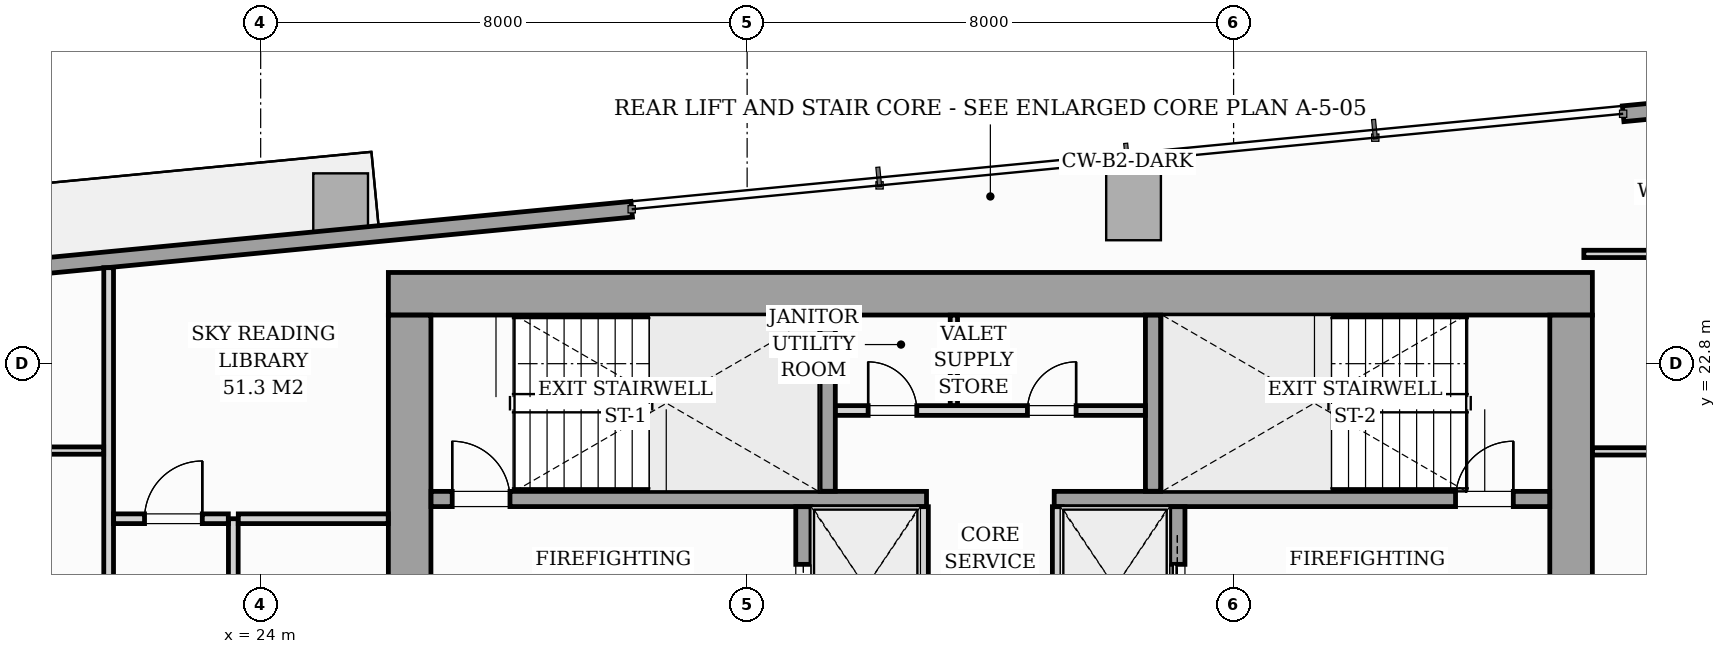
"""IFC4 building model, lengths in metres.
Left out: names, types, materials, properties, quantities, classifications, styles, units other than length and angle.
Written with IfcOpenShell. Run it as: python <this file> out.ifc"""

import sys

from ifc_helpers import new_model, si_unit, direction, frame, frame_2d, origin, origin_2d, place, context, subcontext, project, spatial, rectangle, i_section, extrude, source, transform, mapped, element, fill, save


model = new_model("IFC4")
c1 = context("Model", 3, precision=1e-05, world=origin(), true_north=direction((0.0, 1.0)))
c2 = subcontext(c1, "Body", "Model", "MODEL_VIEW")
j1 = project(units=[si_unit("LENGTHUNIT", "METRE"), si_unit("PLANEANGLEUNIT", "RADIAN")], contexts=[c1])
p1 = place(None, origin())
s1 = spatial("IfcSite", under=j1, at=p1, CompositionType="ELEMENT")
p2 = place(p1, origin())
s2 = spatial("IfcBuilding", under=s1, at=p2, CompositionType="ELEMENT")
p3 = place(p2, frame((0.0, 0.0, 100.2)))
s3 = spatial("IfcBuildingStorey", under=s2, at=p3, CompositionType="ELEMENT", Elevation=100.2)
m1 = source(origin(), c2, "Body", "SweptSolid", [
    extrude(i_section(OverallWidth=0.427, OverallDepth=0.483, WebThickness=0.051, FlangeThickness=0.082, FilletRadius=0.018, at=origin_2d()), origin(), (0.0, 0.0, 1.0), 3.196),
])
for number, where, z_axis, x_axis in (
    (1, (26.4, 24.0, 0.002), (0.0, 0.0, 1.0), (1.0, 0.0, 0.0)),
    (2, (33.12, 24.0, 0.002), (0.0, 0.0, 1.0), (1.0, 0.0, 0.0)),
    (3, (38.88, 24.0, 0.002), (0.0, 0.0, 1.0), (1.0, 0.0, 0.0)),
    (4, (45.6, 24.0, 0.002), (0.0, 0.0, 1.0), (1.0, 0.0, 0.0)),
):
    element("IfcColumn", number, at=place(p3, frame(where, z_axis=z_axis, x_axis=x_axis)), inside=s3, PredefinedType="PILASTER", context=c2, shape_type="MappedRepresentation", body=[
        mapped(m1, transform((0.0, 0.0, 0.0), scale=1.0)),
    ])
m2 = source(origin(), c2, "Body", "SweptSolid", [
    extrude(rectangle(XDim=0.9, YDim=1.1, at=origin_2d()), origin(), (0.0, 0.0, 1.0), 3.196),
])
for number, where, z_axis, x_axis in (
    (5, (25.315, 25.38, 0.002), (0.0, 0.0, 1.0), (0.995, 0.096, 0.0)),
    (6, (38.354, 25.38, 0.002), (0.0, 0.0, 1.0), (0.995, 0.096, 0.0)),
):
    element("IfcColumn", number, at=place(p3, frame(where, z_axis=z_axis, x_axis=x_axis)), inside=s3, PredefinedType="COLUMN", context=c2, shape_type="MappedRepresentation", body=[
        mapped(m2, transform((0.0, 0.0, 0.0), scale=1.0)),
    ])
p4 = place(p3, frame((11.08, 23.508, 0.0), z_axis=(0.0, 0.0, 1.0), x_axis=(0.995396638587, 0.095841180552, 0.0)))
e7 = element("IfcWall", 7, at=p4, inside=s3, PredefinedType="STANDARD", context=c2, shape_type="SweptSolid", body=[
    extrude(rectangle(XDim=19.11, YDim=0.26, at=frame_2d((9.555, 0.0))), origin(), (0.0, 0.0, 1.0), 2.94),
])
p5 = place(p4, frame((7.107, 0.0, 0.0)))
e8 = element("IfcOpeningElement", 8, at=p5, cuts=e7, PredefinedType="OPENING", context=c2, shape_type="SweptSolid", body=[
    extrude(rectangle(XDim=1.8, YDim=2.06, at=frame_2d((0.9, 1.03))), frame((0.0, 0.14, 0.0), z_axis=(0.0, -1.0, 0.0), x_axis=(1.0, 0.0, 0.0)), (0.0, 0.0, 1.0), 0.28),
])
p6 = place(p4, frame((2.05, 0.0, 0.65)))
e9 = element("IfcOpeningElement", 9, at=p6, cuts=e7, PredefinedType="OPENING", context=c2, shape_type="SweptSolid", body=[
    extrude(rectangle(XDim=1.6, YDim=1.5, at=frame_2d((0.8, 0.75))), frame((0.0, 0.14, 0.0), z_axis=(0.0, -1.0, 0.0), x_axis=(1.0, 0.0, 0.0)), (0.0, 0.0, 1.0), 0.28),
])
p7 = place(p3, frame((46.406, 26.91, 0.0), z_axis=(0.0, 0.0, 1.0), x_axis=(0.995396638587, 0.095841180552, 0.0)))
e10 = element("IfcWall", 10, at=p7, inside=s3, PredefinedType="STANDARD", context=c2, shape_type="SweptSolid", body=[
    extrude(rectangle(XDim=19.11, YDim=0.26, at=frame_2d((9.555, 0.0))), origin(), (0.0, 0.0, 1.0), 2.94),
])
p8 = place(p7, frame((9.7, 0.0, 0.0)))
e11 = element("IfcOpeningElement", 11, at=p8, cuts=e10, PredefinedType="OPENING", context=c2, shape_type="SweptSolid", body=[
    extrude(rectangle(XDim=1.8, YDim=2.06, at=frame_2d((0.9, 1.03))), frame((0.0, 0.14, 0.0), z_axis=(0.0, -1.0, 0.0), x_axis=(1.0, 0.0, 0.0)), (0.0, 0.0, 1.0), 0.28),
])
p9 = place(p7, frame((0.7, 0.0, 0.65)))
e12 = element("IfcOpeningElement", 12, at=p9, cuts=e10, PredefinedType="OPENING", context=c2, shape_type="SweptSolid", body=[
    extrude(rectangle(XDim=1.6, YDim=1.5, at=frame_2d((0.8, 0.75))), frame((0.0, 0.14, 0.0), z_axis=(0.0, -1.0, 0.0), x_axis=(1.0, 0.0, 0.0)), (0.0, 0.0, 1.0), 0.28),
])
p10 = place(p3, frame((26.1, 23.95, 0.0), z_axis=(0.0, 0.0, 1.0), x_axis=(1.0, 0.0, 0.0)))
e13 = element("IfcWall", 13, at=p10, inside=s3, PredefinedType="SHEAR", context=c2, shape_type="SweptSolid", body=[
    extrude(rectangle(XDim=19.8, YDim=0.7, at=frame_2d((9.9, 0.0))), origin(), (0.0, 0.0, 1.0), 3.2),
])
for number, where, z_axis, x_axis in (
    (14, (26.45, 17.802, 0.0), (0.0, 0.0, 1.0), (0.0, 1.0, 0.0)),
    (15, (45.55, 17.802, 0.0), (0.0, 0.0, 1.0), (0.0, 1.0, 0.0)),
):
    element("IfcWall", number, at=place(p3, frame(where, z_axis=z_axis, x_axis=x_axis)), inside=s3, PredefinedType="SHEAR", context=c2, shape_type="SweptSolid", body=[
        extrude(rectangle(XDim=5.796, YDim=0.7, at=frame_2d((2.898, 0.0))), origin(), (0.0, 0.0, 1.0), 3.2),
    ])
p11 = place(p3, frame((26.802, 20.575, 0.0), z_axis=(0.0, 0.0, 1.0), x_axis=(1.0, 0.0, 0.0)))
e16 = element("IfcWall", 16, at=p11, inside=s3, PredefinedType="SOLIDWALL", context=c2, shape_type="SweptSolid", body=[
    extrude(rectangle(XDim=8.148, YDim=0.25, at=frame_2d((4.074, 0.0))), origin(), (0.0, 0.0, 1.0), 3.2),
])
p12 = place(p11, frame((0.348, 0.0, 0.0)))
e17 = element("IfcOpeningElement", 17, at=p12, cuts=e16, PredefinedType="OPENING", context=c2, shape_type="SweptSolid", body=[
    extrude(rectangle(XDim=0.95, YDim=2.06, at=frame_2d((0.475, 1.03))), frame((0.0, 0.135, 0.0), z_axis=(0.0, -1.0, 0.0), x_axis=(1.0, 0.0, 0.0)), (0.0, 0.0, 1.0), 0.27),
])
p13 = place(p3, frame((37.05, 20.575, 0.0), z_axis=(0.0, 0.0, 1.0), x_axis=(1.0, 0.0, 0.0)))
e18 = element("IfcWall", 18, at=p13, inside=s3, PredefinedType="SOLIDWALL", context=c2, shape_type="SweptSolid", body=[
    extrude(rectangle(XDim=8.148, YDim=0.25, at=frame_2d((4.074, 0.0))), origin(), (0.0, 0.0, 1.0), 3.2),
])
p14 = place(p13, frame((6.6, 0.0, 0.0)))
e19 = element("IfcOpeningElement", 19, at=p14, cuts=e18, PredefinedType="OPENING", context=c2, shape_type="SweptSolid", body=[
    extrude(rectangle(XDim=0.95, YDim=2.06, at=frame_2d((0.475, 1.03))), frame((0.0, 0.135, 0.0), z_axis=(0.0, -1.0, 0.0), x_axis=(1.0, 0.0, 0.0)), (0.0, 0.0, 1.0), 0.27),
])
for number, where, z_axis, x_axis in (
    (20, (33.325, 20.702, 0.0), (0.0, 0.0, 1.0), (0.0, 1.0, 0.0)),
    (21, (38.675, 20.702, 0.0), (0.0, 0.0, 1.0), (0.0, 1.0, 0.0)),
):
    element("IfcWall", number, at=place(p3, frame(where, z_axis=z_axis, x_axis=x_axis)), inside=s3, PredefinedType="SOLIDWALL", context=c2, shape_type="SweptSolid", body=[
        extrude(rectangle(XDim=2.896, YDim=0.25, at=frame_2d((1.448, 0.0))), origin(), (0.0, 0.0, 1.0), 3.2),
    ])
p15 = place(p3, frame((32.925, 17.802, 0.0), z_axis=(0.0, 0.0, 1.0), x_axis=(0.0, 1.0, 0.0)))
e22 = element("IfcWall", 22, at=p15, inside=s3, PredefinedType="SOLIDWALL", context=c2, shape_type="SweptSolid", body=[
    extrude(rectangle(XDim=2.646, YDim=0.25, at=frame_2d((1.323, 0.0))), origin(), (0.0, 0.0, 1.0), 3.2),
])
p16 = place(p15, frame((0.598, 0.0, 0.0)))
e23 = element("IfcOpeningElement", 23, at=p16, cuts=e22, PredefinedType="OPENING", context=c2, shape_type="SweptSolid", body=[
    extrude(rectangle(XDim=1.1, YDim=2.08, at=frame_2d((0.55, 1.04))), frame((0.0, 0.135, 0.0), z_axis=(0.0, -1.0, 0.0), x_axis=(1.0, 0.0, 0.0)), (0.0, 0.0, 1.0), 0.27),
])
for number, where, z_axis, x_axis in (
    (24, (34.9, 17.802, 0.0), (0.0, 0.0, 1.0), (0.0, 1.0, 0.0)),
    (25, (37.1, 17.802, 0.0), (0.0, 0.0, 1.0), (0.0, 1.0, 0.0)),
):
    element("IfcWall", number, at=place(p3, frame(where, z_axis=z_axis, x_axis=x_axis)), inside=s3, PredefinedType="PARTITIONING", context=c2, shape_type="SweptSolid", body=[
        extrude(rectangle(XDim=2.646, YDim=0.16, at=frame_2d((1.323, 0.0))), origin(), (0.0, 0.0, 1.0), 2.94),
    ])
p17 = place(p3, frame((39.075, 17.802, 0.0), z_axis=(0.0, 0.0, 1.0), x_axis=(0.0, 1.0, 0.0)))
e26 = element("IfcWall", 26, at=p17, inside=s3, PredefinedType="SOLIDWALL", context=c2, shape_type="SweptSolid", body=[
    extrude(rectangle(XDim=2.646, YDim=0.25, at=frame_2d((1.323, 0.0))), origin(), (0.0, 0.0, 1.0), 3.2),
])
p18 = place(p17, frame((0.598, 0.0, 0.0)))
e27 = element("IfcOpeningElement", 27, at=p18, cuts=e26, PredefinedType="OPENING", context=c2, shape_type="SweptSolid", body=[
    extrude(rectangle(XDim=1.1, YDim=2.08, at=frame_2d((0.55, 1.04))), frame((0.0, 0.135, 0.0), z_axis=(0.0, -1.0, 0.0), x_axis=(1.0, 0.0, 0.0)), (0.0, 0.0, 1.0), 0.27),
])
p19 = place(p3, frame((33.452, 22.03, 0.0), z_axis=(0.0, 0.0, 1.0), x_axis=(1.0, 0.0, 0.0)))
e28 = element("IfcWall", 28, at=p19, inside=s3, PredefinedType="PARTITIONING", context=c2, shape_type="SweptSolid", body=[
    extrude(rectangle(XDim=5.096, YDim=0.16, at=frame_2d((2.548, 0.0))), origin(), (0.0, 0.0, 1.0), 2.94),
])
p20 = place(p19, frame((0.538, 0.0, 0.0)))
e29 = element("IfcOpeningElement", 29, at=p20, cuts=e28, PredefinedType="OPENING", context=c2, shape_type="SweptSolid", body=[
    extrude(rectangle(XDim=0.8, YDim=2.05, at=frame_2d((0.4, 1.025))), frame((0.0, 0.09, 0.0), z_axis=(0.0, -1.0, 0.0), x_axis=(1.0, 0.0, 0.0)), (0.0, 0.0, 1.0), 0.18),
])
p21 = place(p19, frame((3.158, 0.0, 0.0)))
e30 = element("IfcOpeningElement", 30, at=p21, cuts=e28, PredefinedType="OPENING", context=c2, shape_type="SweptSolid", body=[
    extrude(rectangle(XDim=0.8, YDim=2.05, at=frame_2d((0.4, 1.025))), frame((0.0, 0.09, 0.0), z_axis=(0.0, -1.0, 0.0), x_axis=(1.0, 0.0, 0.0)), (0.0, 0.0, 1.0), 0.18),
])
p22 = place(p3, frame((35.4, 22.112, 0.0), z_axis=(0.0, 0.0, 1.0), x_axis=(0.0, 1.0, 0.0)))
e31 = element("IfcWall", 31, at=p22, inside=s3, PredefinedType="PARTITIONING", context=c2, shape_type="SweptSolid", body=[
    extrude(rectangle(XDim=1.486, YDim=0.12, at=frame_2d((0.743, 0.0))), origin(), (0.0, 0.0, 1.0), 2.94),
])
p23 = place(p3, frame((21.5, 12.632, 0.0), z_axis=(0.0, 0.0, 1.0), x_axis=(0.0, 1.0, 0.0)))
e32 = element("IfcWall", 32, at=p23, inside=s3, PredefinedType="PARTITIONING", context=c2, shape_type="SweptSolid", body=[
    extrude(rectangle(XDim=11.747, YDim=0.16, at=frame_2d((5.873, 0.0))), origin(), (0.0, 0.0, 1.0), 2.94),
])
p24 = place(p23, frame((0.493, 0.0, 0.0)))
e33 = element("IfcOpeningElement", 33, at=p24, cuts=e32, PredefinedType="OPENING", context=c2, shape_type="SweptSolid", body=[
    extrude(rectangle(XDim=0.95, YDim=2.06, at=frame_2d((0.475, 1.03))), frame((0.0, 0.09, 0.0), z_axis=(0.0, -1.0, 0.0), x_axis=(1.0, 0.0, 0.0)), (0.0, 0.0, 1.0), 0.18),
])
p25 = place(p3, frame((10.293, 21.371, 0.0), z_axis=(0.0, 0.0, 1.0), x_axis=(1.0, 0.0, 0.0)))
e34 = element("IfcWall", 34, at=p25, inside=s3, PredefinedType="PARTITIONING", context=c2, shape_type="SweptSolid", body=[
    extrude(rectangle(XDim=11.125, YDim=0.12, at=frame_2d((5.562, 0.0))), origin(), (0.0, 0.0, 1.0), 2.94),
])
p26 = place(p25, frame((6.33, 0.0, 0.0)))
e35 = element("IfcOpeningElement", 35, at=p26, cuts=e34, PredefinedType="OPENING", context=c2, shape_type="SweptSolid", body=[
    extrude(rectangle(XDim=0.85, YDim=2.05, at=frame_2d((0.425, 1.025))), frame((0.0, 0.07, 0.0), z_axis=(0.0, -1.0, 0.0), x_axis=(1.0, 0.0, 0.0)), (0.0, 0.0, 1.0), 0.14),
])
p27 = place(p3, frame((45.76, 24.605, 0.0), z_axis=(0.0, 0.0, 1.0), x_axis=(1.0, 0.0, 0.0)))
e36 = element("IfcWall", 36, at=p27, inside=s3, PredefinedType="PARTITIONING", context=c2, shape_type="SweptSolid", body=[
    extrude(rectangle(XDim=22.498, YDim=0.12, at=frame_2d((11.249, 0.0))), origin(), (0.0, 0.0, 1.0), 2.94),
])
p28 = place(p27, frame((10.931, 0.0, 0.0)))
e37 = element("IfcOpeningElement", 37, at=p28, cuts=e36, PredefinedType="OPENING", context=c2, shape_type="SweptSolid", body=[
    extrude(rectangle(XDim=0.85, YDim=2.05, at=frame_2d((0.425, 1.025))), frame((0.0, 0.07, 0.0), z_axis=(0.0, -1.0, 0.0), x_axis=(1.0, 0.0, 0.0)), (0.0, 0.0, 1.0), 0.14),
])
p29 = place(p3, frame((45.902, 21.358, 0.0), z_axis=(0.0, 0.0, 1.0), x_axis=(1.0, 0.0, 0.0)))
e38 = element("IfcWall", 38, at=p29, inside=s3, PredefinedType="PARTITIONING", context=c2, shape_type="SweptSolid", body=[
    extrude(rectangle(XDim=22.668, YDim=0.12, at=frame_2d((11.334, 0.0))), origin(), (0.0, 0.0, 1.0), 2.94),
])
p30 = place(p29, frame((10.945, 0.0, 0.0)))
e39 = element("IfcOpeningElement", 39, at=p30, cuts=e38, PredefinedType="OPENING", context=c2, shape_type="SweptSolid", body=[
    extrude(rectangle(XDim=0.85, YDim=2.05, at=frame_2d((0.425, 1.025))), frame((0.0, 0.07, 0.0), z_axis=(0.0, -1.0, 0.0), x_axis=(1.0, 0.0, 0.0)), (0.0, 0.0, 1.0), 0.14),
])
p31 = place(p3, frame((23.55, 14.66, 0.0), z_axis=(0.0, 0.0, 1.0), x_axis=(0.0, 1.0, 0.0)))
e40 = element("IfcWall", 40, at=p31, inside=s3, PredefinedType="PARTITIONING", context=c2, shape_type="SweptSolid", body=[
    extrude(rectangle(XDim=5.59, YDim=0.16, at=frame_2d((2.795, 0.0))), origin(), (0.0, 0.0, 1.0), 2.94),
])
p32 = place(p31, frame((2.36, 0.0, 0.0)))
e41 = element("IfcOpeningElement", 41, at=p32, cuts=e40, PredefinedType="OPENING", context=c2, shape_type="SweptSolid", body=[
    extrude(rectangle(XDim=0.95, YDim=2.06, at=frame_2d((0.475, 1.03))), frame((0.0, 0.09, 0.0), z_axis=(0.0, -1.0, 0.0), x_axis=(1.0, 0.0, 0.0)), (0.0, 0.0, 1.0), 0.18),
])
p33 = place(p3, frame((21.582, 20.25, 0.0), z_axis=(0.0, 0.0, 1.0), x_axis=(1.0, 0.0, 0.0)))
e42 = element("IfcWall", 42, at=p33, inside=s3, PredefinedType="PARTITIONING", context=c2, shape_type="SweptSolid", body=[
    extrude(rectangle(XDim=1.886, YDim=0.16, at=frame_2d((0.943, 0.0))), origin(), (0.0, 0.0, 1.0), 2.94),
])
p34 = place(p33, frame((0.508, 0.0, 0.0)))
e43 = element("IfcOpeningElement", 43, at=p34, cuts=e42, PredefinedType="OPENING", context=c2, shape_type="SweptSolid", body=[
    extrude(rectangle(XDim=0.95, YDim=2.06, at=frame_2d((0.475, 1.03))), frame((0.0, 0.09, 0.0), z_axis=(0.0, -1.0, 0.0), x_axis=(1.0, 0.0, 0.0)), (0.0, 0.0, 1.0), 0.18),
])
p35 = place(p3, frame((23.632, 20.25, 0.0), z_axis=(0.0, 0.0, 1.0), x_axis=(1.0, 0.0, 0.0)))
e44 = element("IfcWall", 44, at=p35, inside=s3, PredefinedType="PARTITIONING", context=c2, shape_type="SweptSolid", body=[
    extrude(rectangle(XDim=2.466, YDim=0.16, at=frame_2d((1.233, 0.0))), origin(), (0.0, 0.0, 1.0), 2.94),
])
m3 = source(origin(), c2, "Body", "SweptSolid", [
    extrude(rectangle(XDim=0.95, YDim=2.06, at=frame_2d((0.475, 1.03))), frame((0.0, 0.025, 0.0), z_axis=(0.0, -1.0, 0.0), x_axis=(1.0, 0.0, 0.0)), (0.0, 0.0, 1.0), 0.05),
])
p36 = place(p12, origin())
e45 = element("IfcDoor", 45, at=p36, inside=s3, OperationType="SINGLE_SWING_LEFT", PredefinedType="DOOR", context=c2, shape_type="MappedRepresentation", body=[
    mapped(m3, transform((0.0, 0.0, 0.0), scale=1.0)),
])
fill(e17, e45)
p37 = place(p14, origin())
e46 = element("IfcDoor", 46, at=p37, inside=s3, OperationType="SINGLE_SWING_RIGHT", PredefinedType="DOOR", context=c2, shape_type="MappedRepresentation", body=[
    mapped(m3, transform((0.0, 0.0, 0.0), scale=1.0)),
])
fill(e19, e46)
m4 = source(origin(), c2, "Body", "SweptSolid", [
    extrude(rectangle(XDim=1.1, YDim=2.08, at=frame_2d((0.55, 1.04))), frame((0.0, 0.025, 0.0), z_axis=(0.0, -1.0, 0.0), x_axis=(1.0, 0.0, 0.0)), (0.0, 0.0, 1.0), 0.05),
])
p38 = place(p16, origin())
e47 = element("IfcDoor", 47, at=p38, inside=s3, OperationType="SLIDING_TO_LEFT", PredefinedType="DOOR", context=c2, shape_type="MappedRepresentation", body=[
    mapped(m4, transform((0.0, 0.0, 0.0), scale=1.0)),
])
fill(e23, e47)
p39 = place(p18, origin())
e48 = element("IfcDoor", 48, at=p39, inside=s3, OperationType="SLIDING_TO_RIGHT", PredefinedType="DOOR", context=c2, shape_type="MappedRepresentation", body=[
    mapped(m4, transform((0.0, 0.0, 0.0), scale=1.0)),
])
fill(e27, e48)
m5 = source(origin(), c2, "Body", "SweptSolid", [
    extrude(rectangle(XDim=0.8, YDim=2.05, at=frame_2d((0.4, 1.025))), frame((0.0, 0.025, 0.0), z_axis=(0.0, -1.0, 0.0), x_axis=(1.0, 0.0, 0.0)), (0.0, 0.0, 1.0), 0.05),
])
p40 = place(p20, origin())
e49 = element("IfcDoor", 49, at=p40, inside=s3, OperationType="SINGLE_SWING_LEFT", PredefinedType="DOOR", context=c2, shape_type="MappedRepresentation", body=[
    mapped(m5, transform((0.0, 0.0, 0.0), scale=1.0)),
])
fill(e29, e49)
p41 = place(p21, origin())
e50 = element("IfcDoor", 50, at=p41, inside=s3, OperationType="SINGLE_SWING_RIGHT", PredefinedType="DOOR", context=c2, shape_type="MappedRepresentation", body=[
    mapped(m5, transform((0.0, 0.0, 0.0), scale=1.0)),
])
fill(e30, e50)
m6 = source(origin(), c2, "Body", "SweptSolid", [
    extrude(rectangle(XDim=0.95, YDim=2.06, at=frame_2d((0.475, 1.03))), frame((0.0, 0.025, 0.0), z_axis=(0.0, -1.0, 0.0), x_axis=(1.0, 0.0, 0.0)), (0.0, 0.0, 1.0), 0.05),
])
p42 = place(p34, origin())
e51 = element("IfcDoor", 51, at=p42, inside=s3, OperationType="SINGLE_SWING_RIGHT", PredefinedType="DOOR", context=c2, shape_type="MappedRepresentation", body=[
    mapped(m6, transform((0.0, 0.0, 0.0), scale=1.0)),
])
fill(e43, e51)
save(model, sys.argv[1])
